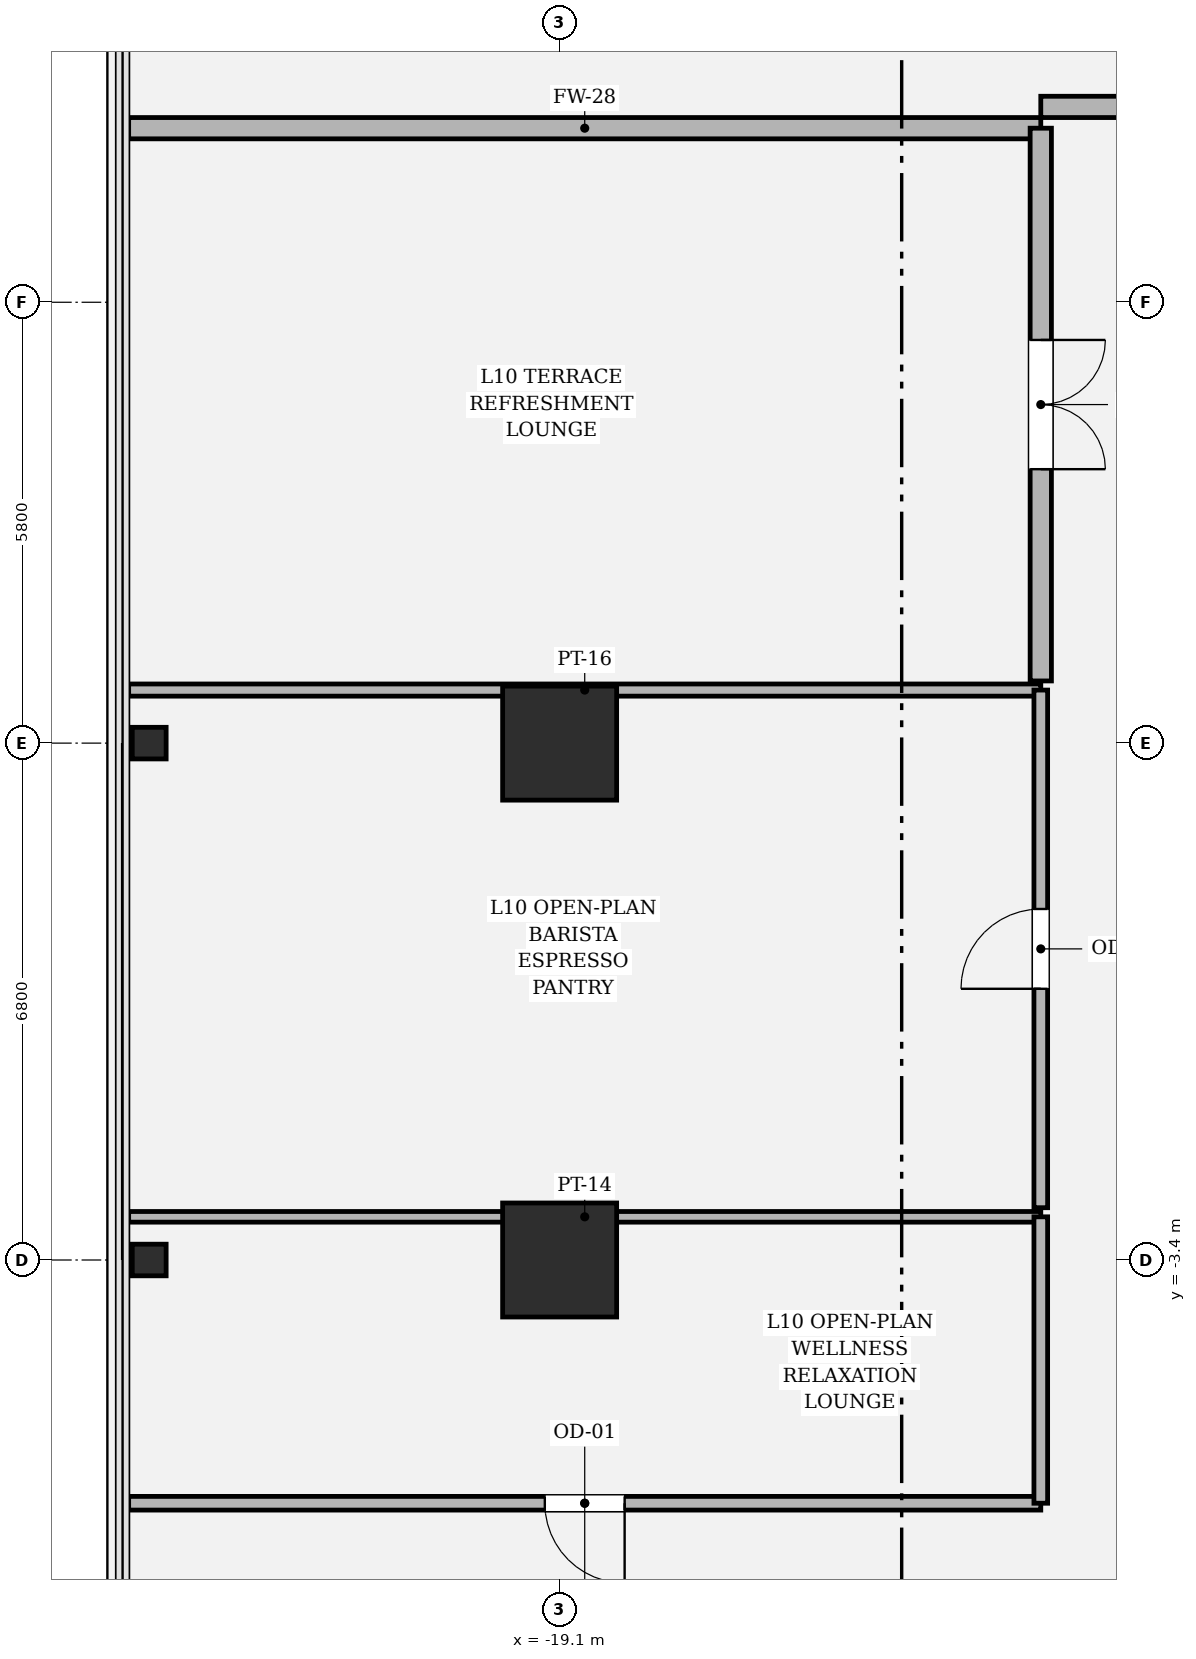
"""IFC4 building model, lengths in metres.
Left out: names, types, materials, properties, quantities, classifications, styles, units other than length and angle.
Written with IfcOpenShell. Run it as: python <this file> out.ifc"""

import sys

from ifc_helpers import new_model, si_unit, direction, frame, frame_2d, origin, origin_2d, place, context, subcontext, project, spatial, rectangle, hollow_rectangle, i_section, extrude, element, fill, save


model = new_model("IFC4")
c1 = context("Model", 3, precision=1e-05, world=origin(), true_north=direction((0.0, 1.0)))
c2 = subcontext(c1, "Body", "Model", "MODEL_VIEW")
j1 = project(units=[si_unit("LENGTHUNIT", "METRE"), si_unit("PLANEANGLEUNIT", "RADIAN")], contexts=[c1])
p1 = place(None, origin())
s1 = spatial("IfcSite", under=j1, at=p1, CompositionType="ELEMENT")
p2 = place(p1, origin())
s2 = spatial("IfcBuilding", under=s1, at=p2, CompositionType="ELEMENT")
p3 = place(p2, frame((0.0, 0.0, 48.45)))
s3 = spatial("IfcBuildingStorey", under=s2, at=p3, CompositionType="ELEMENT", Elevation=48.45)
for number, where, z_axis, x_axis in (
    (1, (-19.1, 3.4, 0.0), (0.0, 0.0, 1.0), (1.0, 0.0, 0.0)),
    (2, (-19.1, -3.4, 0.0), (0.0, 0.0, 1.0), (1.0, 0.0, 0.0)),
):
    element("IfcColumn", number, at=place(p3, frame(where, z_axis=z_axis, x_axis=x_axis)), inside=s3, PredefinedType="COLUMN", context=c2, shape_type="SweptSolid", body=[
        extrude(hollow_rectangle(XDim=1.5, YDim=1.5, WallThickness=0.045, at=origin_2d()), origin(), (0.0, 0.0, 1.0), 4.05),
    ])
for number, where, z_axis, x_axis in (
    (3, (-24.5, -3.4, 0.0), (0.0, 0.0, 1.0), (0.0, 1.0, 0.0)),
    (4, (-24.5, 3.4, 0.0), (0.0, 0.0, 1.0), (0.0, 1.0, 0.0)),
):
    element("IfcColumn", number, at=place(p3, frame(where, z_axis=z_axis, x_axis=x_axis)), inside=s3, PredefinedType="COLUMN", context=c2, shape_type="SweptSolid", body=[
        extrude(i_section(OverallWidth=0.416, OverallDepth=0.446, WebThickness=0.039, FlangeThickness=0.062, FilletRadius=0.018, at=origin_2d()), origin(), (0.0, 0.0, 1.0), 4.048),
    ])
p4 = place(p3, frame((-12.77, -6.6, 0.0), z_axis=(0.0, 0.0, 1.0), x_axis=(-1.0, 0.0, 0.0)))
e5 = element("IfcWall", 5, at=p4, inside=s3, PredefinedType="PARTITIONING", context=c2, shape_type="SweptSolid", body=[
    extrude(rectangle(XDim=12.0, YDim=0.18, at=frame_2d((6.0, 0.0))), origin(), (0.0, 0.0, 1.0), 2.524),
])
p5 = place(p4, frame((5.475, 0.0, 0.0)))
e6 = element("IfcOpeningElement", 6, at=p5, cuts=e5, PredefinedType="OPENING", context=c2, shape_type="SweptSolid", body=[
    extrude(rectangle(XDim=1.05, YDim=2.2, at=frame_2d((0.525, 1.1))), frame((0.0, 0.1, 0.0), z_axis=(0.0, -1.0, 0.0), x_axis=(1.0, 0.0, 0.0)), (0.0, 0.0, 1.0), 0.2),
])
p6 = place(p3, frame((-24.77, -2.832, 0.0), z_axis=(0.0, 0.0, 1.0), x_axis=(1.0, 0.0, 0.0)))
e7 = element("IfcWall", 7, at=p6, inside=s3, PredefinedType="PARTITIONING", context=c2, shape_type="SweptSolid", body=[
    extrude(rectangle(XDim=12.0, YDim=0.14, at=frame_2d((6.0, 0.0))), origin(), (0.0, 0.0, 1.0), 2.524),
])
p7 = place(p3, frame((-12.77, -2.832, 0.0), z_axis=(0.0, 0.0, 1.0), x_axis=(0.0, -1.0, 0.0)))
e8 = element("IfcWall", 8, at=p7, inside=s3, PredefinedType="PARTITIONING", context=c2, shape_type="SweptSolid", body=[
    extrude(rectangle(XDim=3.768, YDim=0.18, at=frame_2d((1.884, 0.0))), origin(), (0.0, 0.0, 1.0), 3.104),
])
p8 = place(p3, frame((-24.77, 4.098, 0.0), z_axis=(0.0, 0.0, 1.0), x_axis=(1.0, 0.0, 0.0)))
e9 = element("IfcWall", 9, at=p8, inside=s3, PredefinedType="PARTITIONING", context=c2, shape_type="SweptSolid", body=[
    extrude(rectangle(XDim=12.0, YDim=0.16, at=frame_2d((6.0, 0.0))), origin(), (0.0, 0.0, 1.0), 2.524),
])
p9 = place(p3, frame((-12.77, 4.098, 0.0), z_axis=(0.0, 0.0, 1.0), x_axis=(0.0, -1.0, 0.0)))
e10 = element("IfcWall", 10, at=p9, inside=s3, PredefinedType="PARTITIONING", context=c2, shape_type="SweptSolid", body=[
    extrude(rectangle(XDim=6.81, YDim=0.18, at=frame_2d((3.405, 0.0))), origin(), (0.0, 0.0, 1.0), 3.104),
])
p10 = place(p9, frame((2.88, 0.0, 0.0)))
e11 = element("IfcOpeningElement", 11, at=p10, cuts=e10, PredefinedType="OPENING", context=c2, shape_type="SweptSolid", body=[
    extrude(rectangle(XDim=1.05, YDim=2.2, at=frame_2d((0.525, 1.1))), frame((0.0, 0.1, 0.0), z_axis=(0.0, -1.0, 0.0), x_axis=(1.0, 0.0, 0.0)), (0.0, 0.0, 1.0), 0.2),
])
p11 = place(p3, frame((-24.77, 11.49, 0.0), z_axis=(0.0, 0.0, 1.0), x_axis=(1.0, 0.0, 0.0)))
e12 = element("IfcWall", 12, at=p11, inside=s3, PredefinedType="SOLIDWALL", context=c2, shape_type="SweptSolid", body=[
    extrude(rectangle(XDim=12.0, YDim=0.28, at=frame_2d((6.0, 0.0))), origin(), (0.0, 0.0, 1.0), 2.524),
])
p12 = place(p3, frame((-12.77, 11.49, 0.0), z_axis=(0.0, 0.0, 1.0), x_axis=(0.0, -1.0, 0.0)))
e13 = element("IfcWall", 13, at=p12, inside=s3, PredefinedType="SOLIDWALL", context=c2, shape_type="SweptSolid", body=[
    extrude(rectangle(XDim=7.272, YDim=0.28, at=frame_2d((3.636, 0.0))), origin(), (0.0, 0.0, 1.0), 3.104),
])
p13 = place(p12, frame((2.786, 0.0, 0.0)))
e14 = element("IfcOpeningElement", 14, at=p13, cuts=e13, PredefinedType="OPENING", context=c2, shape_type="SweptSolid", body=[
    extrude(rectangle(XDim=1.7, YDim=2.3, at=frame_2d((0.85, 1.15))), frame((0.0, 0.15, 0.0), z_axis=(0.0, -1.0, 0.0), x_axis=(1.0, 0.0, 0.0)), (0.0, 0.0, 1.0), 0.3),
])
p14 = place(p3, frame((-1.2, 11.77, 0.0), z_axis=(0.0, 0.0, 1.0), x_axis=(-1.0, 0.0, 0.0)))
e15 = element("IfcWall", 15, at=p14, inside=s3, PredefinedType="SOLIDWALL", context=c2, shape_type="SweptSolid", body=[
    extrude(rectangle(XDim=11.57, YDim=0.28, at=frame_2d((5.785, 0.0))), origin(), (0.0, 0.0, 1.0), 3.104),
])
p15 = place(p5, origin())
e16 = element("IfcDoor", 16, at=p15, inside=s3, OperationType="SINGLE_SWING_LEFT", PredefinedType="DOOR", context=c2, shape_type="SweptSolid", body=[
    extrude(rectangle(XDim=1.05, YDim=2.2, at=frame_2d((0.525, 1.1))), frame((0.0, 0.025, 0.0), z_axis=(0.0, -1.0, 0.0), x_axis=(1.0, 0.0, 0.0)), (0.0, 0.0, 1.0), 0.05),
])
fill(e6, e16)
p16 = place(p10, origin())
e17 = element("IfcDoor", 17, at=p16, inside=s3, OperationType="SINGLE_SWING_RIGHT", PredefinedType="DOOR", context=c2, shape_type="SweptSolid", body=[
    extrude(rectangle(XDim=1.05, YDim=2.2, at=frame_2d((0.525, 1.1))), frame((0.0, 0.025, 0.0), z_axis=(0.0, -1.0, 0.0), x_axis=(1.0, 0.0, 0.0)), (0.0, 0.0, 1.0), 0.05),
])
fill(e11, e17)
p17 = place(p13, origin())
e18 = element("IfcDoor", 18, at=p17, inside=s3, OperationType="DOUBLE_DOOR_SINGLE_SWING", PredefinedType="DOOR", context=c2, shape_type="SweptSolid", body=[
    extrude(rectangle(XDim=1.7, YDim=2.3, at=frame_2d((0.85, 1.15))), frame((0.0, 0.025, 0.0), z_axis=(0.0, -1.0, 0.0), x_axis=(1.0, 0.0, 0.0)), (0.0, 0.0, 1.0), 0.05),
])
fill(e14, e18)
save(model, sys.argv[1])
